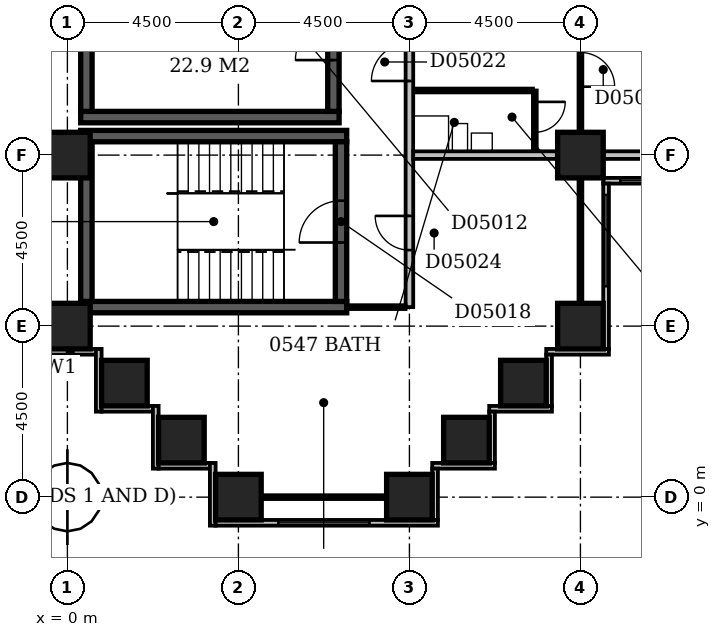
"""IFC4 building model, lengths in metres.
Left out: names, types, materials, properties, quantities, classifications, styles, units other than length and angle.
Written with IfcOpenShell. Run it as: python <this file> out.ifc"""

import sys

from ifc_helpers import new_model, si_unit, direction, frame, frame_2d, origin, origin_2d, place, context, subcontext, project, spatial, rectangle, extrude, element, fill, save


model = new_model("IFC4")
c1 = context("Model", 3, precision=1e-05, world=origin(), true_north=direction((0.0, 1.0)))
c2 = subcontext(c1, "Body", "Model", "MODEL_VIEW")
j1 = project(units=[si_unit("LENGTHUNIT", "METRE"), si_unit("PLANEANGLEUNIT", "RADIAN")], contexts=[c1])
p1 = place(None, origin())
s1 = spatial("IfcSite", under=j1, at=p1, CompositionType="ELEMENT")
p2 = place(p1, origin())
s2 = spatial("IfcBuilding", under=s1, at=p2, CompositionType="ELEMENT")
p3 = place(p2, frame((0.0, 0.0, 29.0)))
s3 = spatial("IfcBuildingStorey", under=s2, at=p3, CompositionType="ELEMENT", Elevation=29.0)
for number, where, z_axis, x_axis in (
    (1, (0.35, 5.0, -0.3), (0.0, 0.0, 1.0), (1.0, 0.0, 0.0)),
    (2, (0.35, 9.5, -0.3), (0.0, 0.0, 1.0), (1.0, 0.0, 0.0)),
):
    element("IfcWall", number, at=place(p3, frame(where, z_axis=z_axis, x_axis=x_axis)), inside=s3, PredefinedType="SHEAR", context=c2, shape_type="SweptSolid", body=[
        extrude(rectangle(XDim=7.0, YDim=0.3, at=frame_2d((3.5, 0.0))), origin(), (0.0, 0.0, 1.0), 3.6),
    ])
p4 = place(p3, frame((0.35, 10.0, -0.3), z_axis=(0.0, 0.0, 1.0), x_axis=(1.0, 0.0, 0.0)))
e3 = element("IfcWall", 3, at=p4, inside=s3, PredefinedType="SHEAR", context=c2, shape_type="SweptSolid", body=[
    extrude(rectangle(XDim=6.8, YDim=0.3, at=frame_2d((3.4, 0.0))), origin(), (0.0, 0.0, 1.0), 3.6),
])
p5 = place(p3, frame((0.5, 5.15, -0.3), z_axis=(0.0, 0.0, 1.0), x_axis=(0.0, 1.0, 0.0)))
e4 = element("IfcWall", 4, at=p5, inside=s3, PredefinedType="SHEAR", context=c2, shape_type="SweptSolid", body=[
    extrude(rectangle(XDim=4.2, YDim=0.3, at=frame_2d((2.1, 0.0))), origin(), (0.0, 0.0, 1.0), 3.6),
])
p6 = place(p3, frame((0.5, 10.15, -0.3), z_axis=(0.0, 0.0, 1.0), x_axis=(0.0, 1.0, 0.0)))
e5 = element("IfcWall", 5, at=p6, inside=s3, PredefinedType="SHEAR", context=c2, shape_type="SweptSolid", body=[
    extrude(rectangle(XDim=3.7, YDim=0.3, at=frame_2d((1.85, 0.0))), origin(), (0.0, 0.0, 1.0), 3.6),
])
p7 = place(p3, frame((7.0, 10.15, -0.3), z_axis=(0.0, 0.0, 1.0), x_axis=(0.0, 1.0, 0.0)))
e6 = element("IfcWall", 6, at=p7, inside=s3, PredefinedType="SHEAR", context=c2, shape_type="SweptSolid", body=[
    extrude(rectangle(XDim=3.7, YDim=0.3, at=frame_2d((1.85, 0.0))), origin(), (0.0, 0.0, 1.0), 3.6),
])
p8 = place(p7, frame((1.35, 0.0, 0.3)))
e7 = element("IfcOpeningElement", 7, at=p8, cuts=e6, PredefinedType="OPENING", context=c2, shape_type="SweptSolid", body=[
    extrude(rectangle(XDim=1.0, YDim=2.1, at=frame_2d((0.5, 1.05))), frame((0.0, 0.162, 0.0), z_axis=(0.0, -1.0, 0.0), x_axis=(1.0, 0.0, 0.0)), (0.0, 0.0, 1.0), 0.324),
])
p9 = place(p3, frame((7.2, 5.15, -0.3), z_axis=(0.0, 0.0, 1.0), x_axis=(0.0, 1.0, 0.0)))
e8 = element("IfcWall", 8, at=p9, inside=s3, PredefinedType="SHEAR", context=c2, shape_type="SweptSolid", body=[
    extrude(rectangle(XDim=4.2, YDim=0.3, at=frame_2d((2.1, 0.0))), origin(), (0.0, 0.0, 1.0), 3.6),
])
p10 = place(p9, frame((1.55, 0.0, 0.3)))
e9 = element("IfcOpeningElement", 9, at=p10, cuts=e8, PredefinedType="OPENING", context=c2, shape_type="SweptSolid", body=[
    extrude(rectangle(XDim=1.1, YDim=2.1, at=frame_2d((0.55, 1.05))), frame((0.0, 0.162, 0.0), z_axis=(0.0, -1.0, 0.0), x_axis=(1.0, 0.0, 0.0)), (0.0, 0.0, 1.0), 0.324),
])
for number, where, z_axis, x_axis in (
    (10, (4.5, 0.0, -0.3), (0.0, 0.0, 1.0), (1.0, 0.0, 0.0)),
    (11, (9.0, 0.0, -0.3), (0.0, 0.0, 1.0), (1.0, 0.0, 0.0)),
    (12, (3.0, 1.5, -0.3), (0.0, 0.0, 1.0), (1.0, 0.0, 0.0)),
    (13, (10.5, 1.5, -0.3), (0.0, 0.0, 1.0), (1.0, 0.0, 0.0)),
    (14, (1.5, 3.0, -0.3), (0.0, 0.0, 1.0), (1.0, 0.0, 0.0)),
    (15, (12.0, 3.0, -0.3), (0.0, 0.0, 1.0), (1.0, 0.0, 0.0)),
    (16, (0.0, 4.5, -0.3), (0.0, 0.0, 1.0), (1.0, 0.0, 0.0)),
    (17, (13.5, 4.5, -0.3), (0.0, 0.0, 1.0), (1.0, 0.0, 0.0)),
    (18, (0.0, 9.0, -0.3), (0.0, 0.0, 1.0), (1.0, 0.0, 0.0)),
    (19, (13.5, 9.0, -0.3), (0.0, 0.0, 1.0), (1.0, 0.0, 0.0)),
):
    element("IfcColumn", number, at=place(p3, frame(where, z_axis=z_axis, x_axis=x_axis)), inside=s3, PredefinedType="COLUMN", context=c2, shape_type="SweptSolid", body=[
        extrude(rectangle(XDim=1.2, YDim=1.2, at=origin_2d()), origin(), (0.0, 0.0, 1.0), 3.6),
    ])
p11 = place(p3, frame((9.675, -0.6, 0.0), z_axis=(0.0, 0.0, 1.0), x_axis=(0.0, 1.0, 0.0)))
e20 = element("IfcWall", 20, at=p11, inside=s3, PredefinedType="STANDARD", context=c2, shape_type="SweptSolid", body=[
    extrude(rectangle(XDim=1.35, YDim=0.15, at=frame_2d((0.675, 0.0))), origin(), (0.0, 0.0, 1.0), 2.7),
])
p12 = place(p3, frame((9.6, 0.825, 0.0), z_axis=(0.0, 0.0, 1.0), x_axis=(1.0, 0.0, 0.0)))
e21 = element("IfcWall", 21, at=p12, inside=s3, PredefinedType="STANDARD", context=c2, shape_type="SweptSolid", body=[
    extrude(rectangle(XDim=1.65, YDim=0.15, at=frame_2d((0.825, 0.0))), origin(), (0.0, 0.0, 1.0), 2.7),
])
p13 = place(p3, frame((11.175, 0.9, 0.0), z_axis=(0.0, 0.0, 1.0), x_axis=(0.0, 1.0, 0.0)))
e22 = element("IfcWall", 22, at=p13, inside=s3, PredefinedType="STANDARD", context=c2, shape_type="SweptSolid", body=[
    extrude(rectangle(XDim=1.35, YDim=0.15, at=frame_2d((0.675, 0.0))), origin(), (0.0, 0.0, 1.0), 2.7),
])
p14 = place(p3, frame((11.1, 2.325, 0.0), z_axis=(0.0, 0.0, 1.0), x_axis=(1.0, 0.0, 0.0)))
e23 = element("IfcWall", 23, at=p14, inside=s3, PredefinedType="STANDARD", context=c2, shape_type="SweptSolid", body=[
    extrude(rectangle(XDim=1.65, YDim=0.15, at=frame_2d((0.825, 0.0))), origin(), (0.0, 0.0, 1.0), 2.7),
])
p15 = place(p3, frame((12.675, 2.4, 0.0), z_axis=(0.0, 0.0, 1.0), x_axis=(0.0, 1.0, 0.0)))
e24 = element("IfcWall", 24, at=p15, inside=s3, PredefinedType="STANDARD", context=c2, shape_type="SweptSolid", body=[
    extrude(rectangle(XDim=1.35, YDim=0.15, at=frame_2d((0.675, 0.0))), origin(), (0.0, 0.0, 1.0), 2.7),
])
p16 = place(p3, frame((12.6, 3.825, 0.0), z_axis=(0.0, 0.0, 1.0), x_axis=(1.0, 0.0, 0.0)))
e25 = element("IfcWall", 25, at=p16, inside=s3, PredefinedType="STANDARD", context=c2, shape_type="SweptSolid", body=[
    extrude(rectangle(XDim=1.65, YDim=0.15, at=frame_2d((0.825, 0.0))), origin(), (0.0, 0.0, 1.0), 2.7),
])
p17 = place(p3, frame((14.175, 3.9, 0.0), z_axis=(0.0, 0.0, 1.0), x_axis=(0.0, 1.0, 0.0)))
e26 = element("IfcWall", 26, at=p17, inside=s3, PredefinedType="STANDARD", context=c2, shape_type="SweptSolid", body=[
    extrude(rectangle(XDim=4.35, YDim=0.15, at=frame_2d((2.175, 0.0))), origin(), (0.0, 0.0, 1.0), 2.7),
])
p18 = place(p17, frame((1.65, 0.0, 0.6)))
e27 = element("IfcOpeningElement", 27, at=p18, cuts=e26, PredefinedType="OPENING", context=c2, shape_type="SweptSolid", body=[
    extrude(rectangle(XDim=2.4, YDim=1.8, at=frame_2d((1.2, 0.9))), frame((0.0, 0.087, 0.0), z_axis=(0.0, -1.0, 0.0), x_axis=(1.0, 0.0, 0.0)), (0.0, 0.0, 1.0), 0.174),
])
p19 = place(p3, frame((14.1, 8.325, 0.0), z_axis=(0.0, 0.0, 1.0), x_axis=(1.0, 0.0, 0.0)))
e28 = element("IfcWall", 28, at=p19, inside=s3, PredefinedType="STANDARD", context=c2, shape_type="SweptSolid", body=[
    extrude(rectangle(XDim=4.65, YDim=0.15, at=frame_2d((2.325, 0.0))), origin(), (0.0, 0.0, 1.0), 2.7),
])
p20 = place(p19, frame((0.45, 0.0, 0.6)))
e29 = element("IfcOpeningElement", 29, at=p20, cuts=e28, PredefinedType="OPENING", context=c2, shape_type="SweptSolid", body=[
    extrude(rectangle(XDim=2.4, YDim=1.8, at=frame_2d((1.2, 0.9))), frame((0.0, 0.087, 0.0), z_axis=(0.0, -1.0, 0.0), x_axis=(1.0, 0.0, 0.0)), (0.0, 0.0, 1.0), 0.174),
])
p21 = place(p3, frame((-0.6, 3.825, 0.0), z_axis=(0.0, 0.0, 1.0), x_axis=(1.0, 0.0, 0.0)))
e30 = element("IfcWall", 30, at=p21, inside=s3, PredefinedType="STANDARD", context=c2, shape_type="SweptSolid", body=[
    extrude(rectangle(XDim=1.35, YDim=0.15, at=frame_2d((0.675, 0.0))), origin(), (0.0, 0.0, 1.0), 2.7),
])
p22 = place(p3, frame((0.825, 3.9, 0.0), z_axis=(0.0, 0.0, 1.0), x_axis=(0.0, -1.0, 0.0)))
e31 = element("IfcWall", 31, at=p22, inside=s3, PredefinedType="STANDARD", context=c2, shape_type="SweptSolid", body=[
    extrude(rectangle(XDim=1.65, YDim=0.15, at=frame_2d((0.825, 0.0))), origin(), (0.0, 0.0, 1.0), 2.7),
])
p23 = place(p3, frame((0.9, 2.325, 0.0), z_axis=(0.0, 0.0, 1.0), x_axis=(1.0, 0.0, 0.0)))
e32 = element("IfcWall", 32, at=p23, inside=s3, PredefinedType="STANDARD", context=c2, shape_type="SweptSolid", body=[
    extrude(rectangle(XDim=1.35, YDim=0.15, at=frame_2d((0.675, 0.0))), origin(), (0.0, 0.0, 1.0), 2.7),
])
p24 = place(p3, frame((2.325, 2.4, 0.0), z_axis=(0.0, 0.0, 1.0), x_axis=(0.0, -1.0, 0.0)))
e33 = element("IfcWall", 33, at=p24, inside=s3, PredefinedType="STANDARD", context=c2, shape_type="SweptSolid", body=[
    extrude(rectangle(XDim=1.65, YDim=0.15, at=frame_2d((0.825, 0.0))), origin(), (0.0, 0.0, 1.0), 2.7),
])
p25 = place(p3, frame((2.4, 0.825, 0.0), z_axis=(0.0, 0.0, 1.0), x_axis=(1.0, 0.0, 0.0)))
e34 = element("IfcWall", 34, at=p25, inside=s3, PredefinedType="STANDARD", context=c2, shape_type="SweptSolid", body=[
    extrude(rectangle(XDim=1.35, YDim=0.15, at=frame_2d((0.675, 0.0))), origin(), (0.0, 0.0, 1.0), 2.7),
])
p26 = place(p3, frame((3.825, 0.9, 0.0), z_axis=(0.0, 0.0, 1.0), x_axis=(0.0, -1.0, 0.0)))
e35 = element("IfcWall", 35, at=p26, inside=s3, PredefinedType="STANDARD", context=c2, shape_type="SweptSolid", body=[
    extrude(rectangle(XDim=1.65, YDim=0.15, at=frame_2d((0.825, 0.0))), origin(), (0.0, 0.0, 1.0), 2.7),
])
p27 = place(p3, frame((3.9, -0.675, 0.0), z_axis=(0.0, 0.0, 1.0), x_axis=(1.0, 0.0, 0.0)))
e36 = element("IfcWall", 36, at=p27, inside=s3, PredefinedType="STANDARD", context=c2, shape_type="SweptSolid", body=[
    extrude(rectangle(XDim=5.85, YDim=0.15, at=frame_2d((2.925, 0.0))), origin(), (0.0, 0.0, 1.0), 2.7),
])
p28 = place(p27, frame((1.65, 0.0, 0.6)))
e37 = element("IfcOpeningElement", 37, at=p28, cuts=e36, PredefinedType="OPENING", context=c2, shape_type="SweptSolid", body=[
    extrude(rectangle(XDim=2.4, YDim=1.8, at=frame_2d((1.2, 0.9))), frame((0.0, 0.087, 0.0), z_axis=(0.0, -1.0, 0.0), x_axis=(1.0, 0.0, 0.0)), (0.0, 0.0, 1.0), 0.174),
])
p29 = place(p3, frame((5.1, 0.0, 0.0), z_axis=(0.0, 0.0, 1.0), x_axis=(1.0, 0.0, 0.0)))
e38 = element("IfcWall", 38, at=p29, inside=s3, PredefinedType="PARTITIONING", context=c2, shape_type="SweptSolid", body=[
    extrude(rectangle(XDim=3.3, YDim=0.1, at=frame_2d((1.65, 0.0))), origin(), (0.0, 0.0, 1.0), 2.7),
])
p30 = place(p3, frame((0.0, 4.4, 0.0), z_axis=(0.0, 0.0, 1.0), x_axis=(0.0, 1.0, 0.0)))
e39 = element("IfcWall", 39, at=p30, inside=s3, PredefinedType="PARTITIONING", context=c2, shape_type="SweptSolid", body=[
    extrude(rectangle(XDim=0.7, YDim=0.1, at=frame_2d((0.35, 0.0))), origin(), (0.0, 0.0, 1.0), 2.7),
])
p31 = place(p3, frame((7.349, 5.0, 0.0), z_axis=(0.0, 0.0, 1.0), x_axis=(1.0, 0.0, 0.0)))
e40 = element("IfcWall", 40, at=p31, inside=s3, PredefinedType="PARTITIONING", context=c2, shape_type="SweptSolid", body=[
    extrude(rectangle(XDim=1.551, YDim=0.1, at=frame_2d((0.775, 0.0))), origin(), (0.0, 0.0, 1.0), 3.3),
])
p32 = place(p3, frame((9.0, 5.0, 0.0), z_axis=(0.0, 0.0, 1.0), x_axis=(0.0, 1.0, 0.0)))
e41 = element("IfcWall", 41, at=p32, inside=s3, PredefinedType="PARTITIONING", context=c2, shape_type="SweptSolid", body=[
    extrude(rectangle(XDim=44.5, YDim=0.2, at=frame_2d((22.25, 0.0))), origin(), (0.0, 0.0, 1.0), 3.3),
])
p33 = place(p32, frame((24.7, 0.0, 0.0)))
e42 = element("IfcOpeningElement", 42, at=p33, cuts=e41, PredefinedType="OPENING", context=c2, shape_type="SweptSolid", body=[
    extrude(rectangle(XDim=1.0, YDim=2.1, at=frame_2d((0.5, 1.05))), frame((0.0, 0.112, 0.0), z_axis=(0.0, -1.0, 0.0), x_axis=(1.0, 0.0, 0.0)), (0.0, 0.0, 1.0), 0.224),
])
p34 = place(p32, frame((13.3, 0.0, 0.0)))
e43 = element("IfcOpeningElement", 43, at=p34, cuts=e41, PredefinedType="OPENING", context=c2, shape_type="SweptSolid", body=[
    extrude(rectangle(XDim=1.0, YDim=2.1, at=frame_2d((0.5, 1.05))), frame((0.0, 0.112, 0.0), z_axis=(0.0, -1.0, 0.0), x_axis=(1.0, 0.0, 0.0)), (0.0, 0.0, 1.0), 0.224),
])
p35 = place(p32, frame((10.45, 0.0, 0.0)))
e44 = element("IfcOpeningElement", 44, at=p35, cuts=e41, PredefinedType="OPENING", context=c2, shape_type="SweptSolid", body=[
    extrude(rectangle(XDim=1.0, YDim=2.1, at=frame_2d((0.5, 1.05))), frame((0.0, 0.112, 0.0), z_axis=(0.0, -1.0, 0.0), x_axis=(1.0, 0.0, 0.0)), (0.0, 0.0, 1.0), 0.224),
])
p36 = place(p32, frame((5.95, 0.0, 0.0)))
e45 = element("IfcOpeningElement", 45, at=p36, cuts=e41, PredefinedType="OPENING", context=c2, shape_type="SweptSolid", body=[
    extrude(rectangle(XDim=1.0, YDim=2.1, at=frame_2d((0.5, 1.05))), frame((0.0, 0.112, 0.0), z_axis=(0.0, -1.0, 0.0), x_axis=(1.0, 0.0, 0.0)), (0.0, 0.0, 1.0), 0.224),
])
p37 = place(p32, frame((37.25, 0.0, 0.0)))
e46 = element("IfcOpeningElement", 46, at=p37, cuts=e41, PredefinedType="OPENING", context=c2, shape_type="SweptSolid", body=[
    extrude(rectangle(XDim=0.9, YDim=2.1, at=frame_2d((0.45, 1.05))), frame((0.0, 0.112, 0.0), z_axis=(0.0, -1.0, 0.0), x_axis=(1.0, 0.0, 0.0)), (0.0, 0.0, 1.0), 0.224),
])
p38 = place(p32, frame((1.5, 0.0, 0.0)))
e47 = element("IfcOpeningElement", 47, at=p38, cuts=e41, PredefinedType="OPENING", context=c2, shape_type="SweptSolid", body=[
    extrude(rectangle(XDim=0.9, YDim=2.1, at=frame_2d((0.45, 1.05))), frame((0.0, 0.112, 0.0), z_axis=(0.0, -1.0, 0.0), x_axis=(1.0, 0.0, 0.0)), (0.0, 0.0, 1.0), 0.224),
])
p39 = place(p3, frame((13.5, 5.1, 0.0), z_axis=(0.0, 0.0, 1.0), x_axis=(0.0, 1.0, 0.0)))
e48 = element("IfcWall", 48, at=p39, inside=s3, PredefinedType="PARTITIONING", context=c2, shape_type="SweptSolid", body=[
    extrude(rectangle(XDim=3.3, YDim=0.1, at=frame_2d((1.65, 0.0))), origin(), (0.0, 0.0, 1.0), 2.7),
])
p40 = place(p3, frame((9.1, 9.0, 0.0), z_axis=(0.0, 0.0, 1.0), x_axis=(1.0, 0.0, 0.0)))
e49 = element("IfcWall", 49, at=p40, inside=s3, PredefinedType="PARTITIONING", context=c2, shape_type="SweptSolid", body=[
    extrude(rectangle(XDim=3.8, YDim=0.2, at=frame_2d((1.9, 0.0))), origin(), (0.0, 0.0, 1.0), 3.3),
])
p41 = place(p3, frame((14.1, 9.0, 0.0), z_axis=(0.0, 0.0, 1.0), x_axis=(1.0, 0.0, 0.0)))
e50 = element("IfcWall", 50, at=p41, inside=s3, PredefinedType="PARTITIONING", context=c2, shape_type="SweptSolid", body=[
    extrude(rectangle(XDim=3.3, YDim=0.2, at=frame_2d((1.65, 0.0))), origin(), (0.0, 0.0, 1.0), 2.7),
])
p42 = place(p3, frame((12.3, 9.1, 0.0), z_axis=(0.0, 0.0, 1.0), x_axis=(0.0, 1.0, 0.0)))
e51 = element("IfcWall", 51, at=p42, inside=s3, PredefinedType="PARTITIONING", context=c2, shape_type="SweptSolid", body=[
    extrude(rectangle(XDim=1.6, YDim=0.1, at=frame_2d((0.8, 0.0))), origin(), (0.0, 0.0, 1.0), 3.3),
])
p43 = place(p42, frame((0.5, 0.0, 0.0)))
e52 = element("IfcOpeningElement", 52, at=p43, cuts=e51, PredefinedType="OPENING", context=c2, shape_type="SweptSolid", body=[
    extrude(rectangle(XDim=0.8, YDim=2.1, at=frame_2d((0.4, 1.05))), frame((0.0, 0.062, 0.0), z_axis=(0.0, -1.0, 0.0), x_axis=(1.0, 0.0, 0.0)), (0.0, 0.0, 1.0), 0.124),
])
p44 = place(p3, frame((13.5, 9.6, 0.0), z_axis=(0.0, 0.0, 1.0), x_axis=(0.0, 1.0, 0.0)))
e53 = element("IfcWall", 53, at=p44, inside=s3, PredefinedType="PARTITIONING", context=c2, shape_type="SweptSolid", body=[
    extrude(rectangle(XDim=8.3, YDim=0.1, at=frame_2d((4.15, 0.0))), origin(), (0.0, 0.0, 1.0), 3.3),
])
p45 = place(p44, frame((5.7, 0.0, 0.0)))
e54 = element("IfcOpeningElement", 54, at=p45, cuts=e53, PredefinedType="OPENING", context=c2, shape_type="SweptSolid", body=[
    extrude(rectangle(XDim=0.9, YDim=2.1, at=frame_2d((0.45, 1.05))), frame((0.0, 0.062, 0.0), z_axis=(0.0, -1.0, 0.0), x_axis=(1.0, 0.0, 0.0)), (0.0, 0.0, 1.0), 0.124),
])
p46 = place(p44, frame((1.2, 0.0, 0.0)))
e55 = element("IfcOpeningElement", 55, at=p46, cuts=e53, PredefinedType="OPENING", context=c2, shape_type="SweptSolid", body=[
    extrude(rectangle(XDim=0.9, YDim=2.1, at=frame_2d((0.45, 1.05))), frame((0.0, 0.062, 0.0), z_axis=(0.0, -1.0, 0.0), x_axis=(1.0, 0.0, 0.0)), (0.0, 0.0, 1.0), 0.124),
])
p47 = place(p3, frame((9.1, 10.7, 0.0), z_axis=(0.0, 0.0, 1.0), x_axis=(1.0, 0.0, 0.0)))
e56 = element("IfcWall", 56, at=p47, inside=s3, PredefinedType="PLUMBINGWALL", context=c2, shape_type="SweptSolid", body=[
    extrude(rectangle(XDim=3.15, YDim=0.1, at=frame_2d((1.575, 0.0))), origin(), (0.0, 0.0, 1.0), 3.3),
])
p48 = place(p18, origin())
e57 = element("IfcWindow", 57, at=p48, inside=s3, PartitioningType="SINGLE_PANEL", PredefinedType="WINDOW", context=c2, shape_type="SweptSolid", body=[
    extrude(rectangle(XDim=2.4, YDim=1.8, at=frame_2d((1.2, 0.9))), frame((0.0, 0.03, 0.0), z_axis=(0.0, -1.0, 0.0), x_axis=(1.0, 0.0, 0.0)), (0.0, 0.0, 1.0), 0.06),
])
fill(e27, e57)
p49 = place(p20, origin())
e58 = element("IfcWindow", 58, at=p49, inside=s3, PartitioningType="SINGLE_PANEL", PredefinedType="WINDOW", context=c2, shape_type="SweptSolid", body=[
    extrude(rectangle(XDim=2.4, YDim=1.8, at=frame_2d((1.2, 0.9))), frame((0.0, 0.03, 0.0), z_axis=(0.0, -1.0, 0.0), x_axis=(1.0, 0.0, 0.0)), (0.0, 0.0, 1.0), 0.06),
])
fill(e29, e58)
p50 = place(p28, origin())
e59 = element("IfcWindow", 59, at=p50, inside=s3, PartitioningType="SINGLE_PANEL", PredefinedType="WINDOW", context=c2, shape_type="SweptSolid", body=[
    extrude(rectangle(XDim=2.4, YDim=1.8, at=frame_2d((1.2, 0.9))), frame((0.0, 0.03, 0.0), z_axis=(0.0, -1.0, 0.0), x_axis=(1.0, 0.0, 0.0)), (0.0, 0.0, 1.0), 0.06),
])
fill(e37, e59)
p51 = place(p8, origin())
e60 = element("IfcDoor", 60, at=p51, inside=s3, OperationType="SINGLE_SWING_LEFT", PredefinedType="DOOR", context=c2, shape_type="SweptSolid", body=[
    extrude(rectangle(XDim=1.0, YDim=2.1, at=frame_2d((0.5, 1.05))), frame((0.0, 0.025, 0.0), z_axis=(0.0, -1.0, 0.0), x_axis=(1.0, 0.0, 0.0)), (0.0, 0.0, 1.0), 0.05),
])
fill(e7, e60)
p52 = place(p10, origin())
e61 = element("IfcDoor", 61, at=p52, inside=s3, OperationType="SINGLE_SWING_LEFT", PredefinedType="DOOR", context=c2, shape_type="SweptSolid", body=[
    extrude(rectangle(XDim=1.1, YDim=2.1, at=frame_2d((0.55, 1.05))), frame((0.0, 0.025, 0.0), z_axis=(0.0, -1.0, 0.0), x_axis=(1.0, 0.0, 0.0)), (0.0, 0.0, 1.0), 0.05),
])
fill(e9, e61)
p53 = place(p36, origin())
e62 = element("IfcDoor", 62, at=p53, inside=s3, OperationType="SINGLE_SWING_LEFT", PredefinedType="DOOR", context=c2, shape_type="SweptSolid", body=[
    extrude(rectangle(XDim=1.0, YDim=2.1, at=frame_2d((0.5, 1.05))), frame((0.0, 0.025, 0.0), z_axis=(0.0, -1.0, 0.0), x_axis=(1.0, 0.0, 0.0)), (0.0, 0.0, 1.0), 0.05),
])
fill(e45, e62)
p54 = place(p38, frame((0.9, 0.0, 0.0), z_axis=(0.0, 0.0, 1.0), x_axis=(-1.0, 0.0, 0.0)))
e63 = element("IfcDoor", 63, at=p54, inside=s3, OperationType="SINGLE_SWING_LEFT", PredefinedType="DOOR", context=c2, shape_type="SweptSolid", body=[
    extrude(rectangle(XDim=0.9, YDim=2.1, at=frame_2d((0.45, 1.05))), frame((0.0, 0.025, 0.0), z_axis=(0.0, -1.0, 0.0), x_axis=(1.0, 0.0, 0.0)), (0.0, 0.0, 1.0), 0.05),
])
fill(e47, e63)
p55 = place(p43, origin())
e64 = element("IfcDoor", 64, at=p55, inside=s3, OperationType="SINGLE_SWING_RIGHT", PredefinedType="DOOR", context=c2, shape_type="SweptSolid", body=[
    extrude(rectangle(XDim=0.8, YDim=2.1, at=frame_2d((0.4, 1.05))), frame((0.0, 0.025, 0.0), z_axis=(0.0, -1.0, 0.0), x_axis=(1.0, 0.0, 0.0)), (0.0, 0.0, 1.0), 0.05),
])
fill(e52, e64)
p56 = place(p46, frame((0.9, 0.0, 0.0), z_axis=(0.0, 0.0, 1.0), x_axis=(-1.0, 0.0, 0.0)))
e65 = element("IfcDoor", 65, at=p56, inside=s3, OperationType="SINGLE_SWING_RIGHT", PredefinedType="DOOR", context=c2, shape_type="SweptSolid", body=[
    extrude(rectangle(XDim=0.9, YDim=2.1, at=frame_2d((0.45, 1.05))), frame((0.0, 0.025, 0.0), z_axis=(0.0, -1.0, 0.0), x_axis=(1.0, 0.0, 0.0)), (0.0, 0.0, 1.0), 0.05),
])
fill(e55, e65)
save(model, sys.argv[1])
